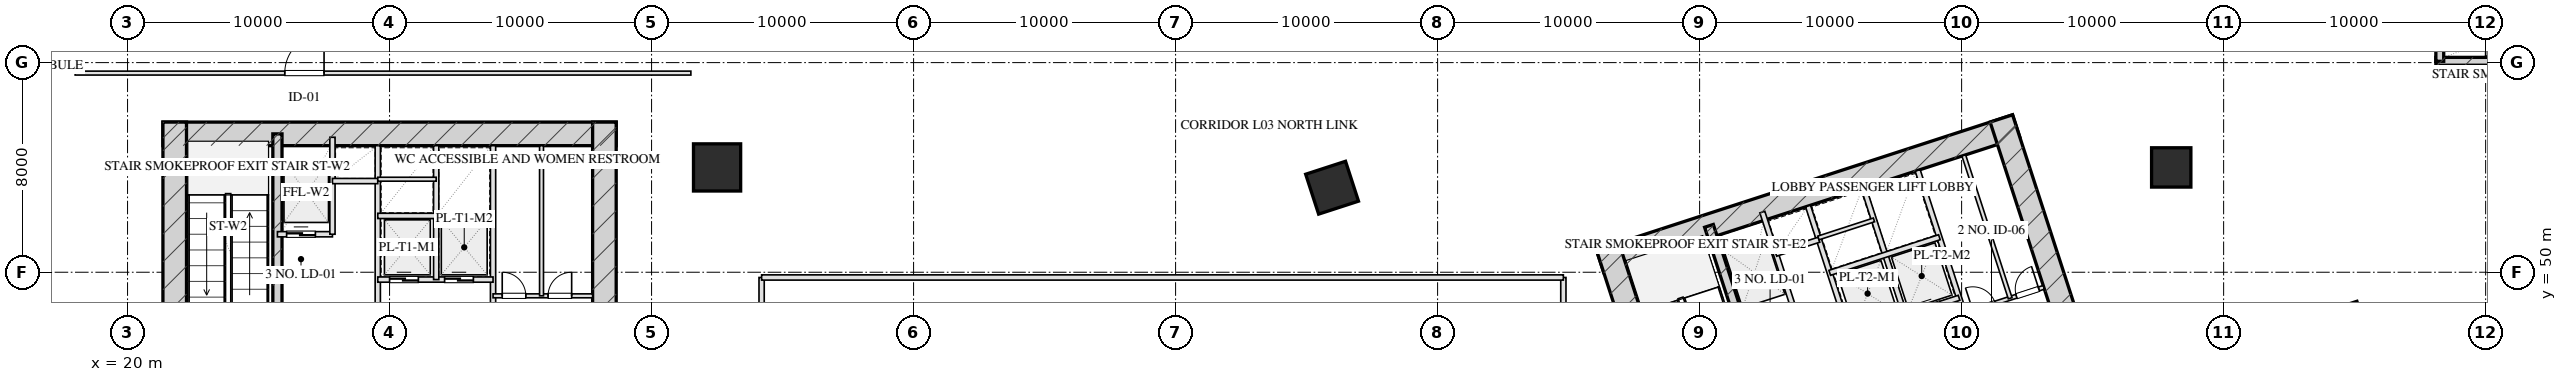
"""IFC4 building model, lengths in metres.
Left out: names, types, materials, properties, quantities, classifications, styles, units other than length and angle.
Written with IfcOpenShell. Run it as: python <this file> out.ifc"""

import sys

from ifc_helpers import new_model, si_unit, direction, frame, frame_2d, origin, origin_2d, place, context, subcontext, project, spatial, rectangle, hollow_rectangle, extrude, element, fill, save


model = new_model("IFC4")
c1 = context("Model", 3, precision=1e-05, world=origin(), true_north=direction((0.0, 1.0)))
c2 = subcontext(c1, "Body", "Model", "MODEL_VIEW")
j1 = project(units=[si_unit("LENGTHUNIT", "METRE"), si_unit("PLANEANGLEUNIT", "RADIAN")], contexts=[c1])
p1 = place(None, origin())
s1 = spatial("IfcSite", under=j1, at=p1, CompositionType="ELEMENT")
p2 = place(p1, origin())
s2 = spatial("IfcBuilding", under=s1, at=p2, CompositionType="ELEMENT")
p3 = place(p2, frame((0.0, 0.0, 16.5)))
s3 = spatial("IfcBuildingStorey", under=s2, at=p3, CompositionType="ELEMENT", Elevation=16.5)
p4 = place(p3, frame((21.35, 55.28, 0.0), z_axis=(0.0, 0.0, 1.0), x_axis=(1.0, 0.0, 0.0)))
e1 = element("IfcWall", 1, at=p4, inside=s3, PredefinedType="SHEAR", context=c2, shape_type="SweptSolid", body=[
    extrude(rectangle(XDim=17.3, YDim=0.9, at=frame_2d((8.65, 0.0))), origin(), (0.0, 0.0, 1.0), 5.5),
])
for number, where, z_axis, x_axis in (
    (2, (21.8, 45.95, 0.0), (0.0, 0.0, 1.0), (0.0, 1.0, 0.0)),
    (3, (38.2, 45.95, 0.0), (0.0, 0.0, 1.0), (0.0, 1.0, 0.0)),
):
    element("IfcWall", number, at=place(p3, frame(where, z_axis=z_axis, x_axis=x_axis)), inside=s3, PredefinedType="SHEAR", context=c2, shape_type="SweptSolid", body=[
        extrude(rectangle(XDim=9.78, YDim=0.9, at=frame_2d((4.89, 0.0))), origin(), (0.0, 0.0, 1.0), 5.5),
    ])
p5 = place(p3, frame((25.72, 48.3, 0.0), z_axis=(0.0, 0.0, 1.0), x_axis=(0.0, 1.0, 0.0)))
e4 = element("IfcWall", 4, at=p5, inside=s3, PredefinedType="SHEAR", context=c2, shape_type="SweptSolid", body=[
    extrude(rectangle(XDim=6.98, YDim=0.35, at=frame_2d((3.49, 0.0))), origin(), (0.0, 0.0, 1.0), 5.5),
])
p6 = place(p3, frame((76.201, 50.419, 0.0), z_axis=(0.0, 0.0, 1.0), x_axis=(0.951056412142, 0.309017314926, 0.0)))
e5 = element("IfcWall", 5, at=p6, inside=s3, PredefinedType="SHEAR", context=c2, shape_type="SweptSolid", body=[
    extrude(rectangle(XDim=16.7, YDim=0.9, at=frame_2d((8.35, 0.0))), origin(), (0.0, 0.0, 1.0), 5.5),
])
for number, where, z_axis, x_axis in (
    (6, (79.512, 41.685, 0.0), (0.0, 0.0, 1.0), (-0.309, 0.951, 0.0)),
    (7, (94.539, 46.568, 0.0), (0.0, 0.0, 1.0), (-0.309, 0.951, 0.0)),
):
    element("IfcWall", number, at=place(p3, frame(where, z_axis=z_axis, x_axis=x_axis)), inside=s3, PredefinedType="SHEAR", context=c2, shape_type="SweptSolid", body=[
        extrude(rectangle(XDim=9.78, YDim=0.9, at=frame_2d((4.89, 0.0))), origin(), (0.0, 0.0, 1.0), 5.5),
    ])
p7 = place(p3, frame((82.514, 45.131, 0.0), z_axis=(0.0, 0.0, 1.0), x_axis=(-0.308988790936, 0.951065679686, 0.0)))
e8 = element("IfcWall", 8, at=p7, inside=s3, PredefinedType="SHEAR", context=c2, shape_type="SweptSolid", body=[
    extrude(rectangle(XDim=6.98, YDim=0.35, at=frame_2d((3.49, 0.0))), origin(), (0.0, 0.0, 1.0), 5.5),
])
p8 = place(p3, frame((108.1, 58.05, 0.0), z_axis=(0.0, 0.0, 1.0), x_axis=(1.0, 0.0, 0.0)))
e9 = element("IfcWall", 9, at=p8, inside=s3, PredefinedType="SHEAR", context=c2, shape_type="SweptSolid", body=[
    extrude(rectangle(XDim=8.9, YDim=0.3, at=frame_2d((4.45, 0.0))), origin(), (0.0, 0.0, 1.0), 5.5),
])
p9 = place(p3, frame((108.25, 58.05, 0.0), z_axis=(0.0, 0.0, 1.0), x_axis=(0.0, 1.0, 0.0)))
e10 = element("IfcWall", 10, at=p9, inside=s3, PredefinedType="SHEAR", context=c2, shape_type="SweptSolid", body=[
    extrude(rectangle(XDim=3.4, YDim=0.3, at=frame_2d((1.7, 0.0))), origin(), (0.0, 0.0, 1.0), 5.5),
])
p10 = place(p9, frame((0.65, 0.0, 0.0)))
e11 = element("IfcOpeningElement", 11, at=p10, cuts=e10, PredefinedType="OPENING", context=c2, shape_type="SweptSolid", body=[
    extrude(rectangle(XDim=1.2, YDim=2.05, at=frame_2d((0.6, 1.025))), frame((0.0, 0.16, 0.0), z_axis=(0.0, -1.0, 0.0), x_axis=(1.0, 0.0, 0.0)), (0.0, 0.0, 1.0), 0.32),
])
p11 = place(p3, frame((42.5, 54.0, 0.0), z_axis=(0.0, 0.0, 1.0), x_axis=(1.0, 0.0, 0.0)))
e12 = element("IfcColumn", 12, at=p11, inside=s3, PredefinedType="COLUMN", context=c2, shape_type="SweptSolid", body=[
    extrude(hollow_rectangle(XDim=1.8, YDim=1.8, WallThickness=0.06, at=origin_2d()), origin(), (0.0, 0.0, 1.0), 5.501),
])
p12 = place(p3, frame((98.0, 54.0, 0.0), z_axis=(0.0, 0.0, 1.0), x_axis=(1.0, 0.0, 0.0)))
e13 = element("IfcColumn", 13, at=p12, inside=s3, PredefinedType="COLUMN", context=c2, shape_type="SweptSolid", body=[
    extrude(rectangle(XDim=1.5, YDim=1.5, at=origin_2d()), origin(), (0.0, 0.0, 1.0), 5.501),
])
p13 = place(p3, frame((65.973, 53.226, 0.0), z_axis=(0.0, 0.0, 1.0), x_axis=(0.951056516295, 0.309016994375, 0.0)))
e14 = element("IfcColumn", 14, at=p13, inside=s3, PredefinedType="COLUMN", context=c2, shape_type="SweptSolid", body=[
    extrude(hollow_rectangle(XDim=1.6, YDim=1.6, WallThickness=0.055, at=origin_2d()), origin(), (0.0, 0.0, 1.0), 5.501),
])
p14 = place(p3, frame((104.766, 48.261, 0.0), z_axis=(0.0, 0.0, 1.0), x_axis=(0.951056516295, 0.309016994375, 0.0)))
e15 = element("IfcColumn", 15, at=p14, inside=s3, PredefinedType="COLUMN", context=c2, shape_type="SweptSolid", body=[
    extrude(hollow_rectangle(XDim=1.0, YDim=1.0, WallThickness=0.036, at=origin_2d()), origin(), (0.0, 0.0, 1.0), 5.501),
])
p15 = place(p3, frame((29.55, 46.4, 0.0), z_axis=(0.0, 0.0, 1.0), x_axis=(0.0, 1.0, 0.0)))
e16 = element("IfcWall", 16, at=p15, inside=s3, PredefinedType="PARTITIONING", context=c2, shape_type="SweptSolid", body=[
    extrude(rectangle(XDim=8.43, YDim=0.2, at=frame_2d((4.215, 0.0))), origin(), (0.0, 0.0, 1.0), 5.185),
])
p16 = place(p3, frame((25.72, 51.45, 0.0), z_axis=(0.0, 0.0, 1.0), x_axis=(1.0, 0.0, 0.0)))
e17 = element("IfcWall", 17, at=p16, inside=s3, PredefinedType="PARTITIONING", context=c2, shape_type="SweptSolid", body=[
    extrude(rectangle(XDim=2.1, YDim=0.2, at=frame_2d((1.05, 0.0))), origin(), (0.0, 0.0, 1.0), 5.185),
])
p17 = place(p16, frame((0.35, 0.0, 0.0)))
e18 = element("IfcOpeningElement", 18, at=p17, cuts=e17, PredefinedType="OPENING", context=c2, shape_type="SweptSolid", body=[
    extrude(rectangle(XDim=1.1, YDim=2.05, at=frame_2d((0.55, 1.025))), frame((0.0, 0.11, 0.0), z_axis=(0.0, -1.0, 0.0), x_axis=(1.0, 0.0, 0.0)), (0.0, 0.0, 1.0), 0.22),
])
p18 = place(p3, frame((27.82, 51.45, 0.0), z_axis=(0.0, 0.0, 1.0), x_axis=(0.0, 1.0, 0.0)))
e19 = element("IfcWall", 19, at=p18, inside=s3, PredefinedType="PARTITIONING", context=c2, shape_type="SweptSolid", body=[
    extrude(rectangle(XDim=3.7, YDim=0.2, at=frame_2d((1.85, 0.0))), origin(), (0.0, 0.0, 1.0), 5.185),
])
p19 = place(p3, frame((27.82, 53.48, 0.0), z_axis=(0.0, 0.0, 1.0), x_axis=(1.0, 0.0, 0.0)))
e20 = element("IfcWall", 20, at=p19, inside=s3, PredefinedType="PARTITIONING", context=c2, shape_type="SweptSolid", body=[
    extrude(rectangle(XDim=1.73, YDim=0.2, at=frame_2d((0.865, 0.0))), origin(), (0.0, 0.0, 1.0), 5.185),
])
p20 = place(p3, frame((33.95, 46.4, 0.0), z_axis=(0.0, 0.0, 1.0), x_axis=(0.0, 1.0, 0.0)))
e21 = element("IfcWall", 21, at=p20, inside=s3, PredefinedType="PARTITIONING", context=c2, shape_type="SweptSolid", body=[
    extrude(rectangle(XDim=8.43, YDim=0.2, at=frame_2d((4.215, 0.0))), origin(), (0.0, 0.0, 1.0), 5.185),
])
p21 = place(p3, frame((29.55, 49.72, 0.0), z_axis=(0.0, 0.0, 1.0), x_axis=(1.0, 0.0, 0.0)))
e22 = element("IfcWall", 22, at=p21, inside=s3, PredefinedType="PARTITIONING", context=c2, shape_type="SweptSolid", body=[
    extrude(rectangle(XDim=4.4, YDim=0.2, at=frame_2d((2.2, 0.0))), origin(), (0.0, 0.0, 1.0), 5.185),
])
p22 = place(p21, frame((0.45, 0.0, 0.0)))
e23 = element("IfcOpeningElement", 23, at=p22, cuts=e22, PredefinedType="OPENING", context=c2, shape_type="SweptSolid", body=[
    extrude(rectangle(XDim=1.1, YDim=2.05, at=frame_2d((0.55, 1.025))), frame((0.0, 0.11, 0.0), z_axis=(0.0, -1.0, 0.0), x_axis=(1.0, 0.0, 0.0)), (0.0, 0.0, 1.0), 0.22),
])
p23 = place(p21, frame((2.55, 0.0, 0.0)))
e24 = element("IfcOpeningElement", 24, at=p23, cuts=e22, PredefinedType="OPENING", context=c2, shape_type="SweptSolid", body=[
    extrude(rectangle(XDim=1.1, YDim=2.05, at=frame_2d((0.55, 1.025))), frame((0.0, 0.11, 0.0), z_axis=(0.0, -1.0, 0.0), x_axis=(1.0, 0.0, 0.0)), (0.0, 0.0, 1.0), 0.22),
])
p24 = place(p3, frame((31.78, 49.72, 0.0), z_axis=(0.0, 0.0, 1.0), x_axis=(0.0, 1.0, 0.0)))
e25 = element("IfcWall", 25, at=p24, inside=s3, PredefinedType="PARTITIONING", context=c2, shape_type="SweptSolid", body=[
    extrude(rectangle(XDim=5.11, YDim=0.2, at=frame_2d((2.555, 0.0))), origin(), (0.0, 0.0, 1.0), 5.185),
])
p25 = place(p3, frame((29.55, 52.15, 0.0), z_axis=(0.0, 0.0, 1.0), x_axis=(1.0, 0.0, 0.0)))
e26 = element("IfcWall", 26, at=p25, inside=s3, PredefinedType="PARTITIONING", context=c2, shape_type="SweptSolid", body=[
    extrude(rectangle(XDim=4.4, YDim=0.2, at=frame_2d((2.2, 0.0))), origin(), (0.0, 0.0, 1.0), 5.185),
])
p26 = place(p3, frame((29.55, 53.55, 0.0), z_axis=(0.0, 0.0, 1.0), x_axis=(1.0, 0.0, 0.0)))
e27 = element("IfcWall", 27, at=p26, inside=s3, PredefinedType="PARTITIONING", context=c2, shape_type="SweptSolid", body=[
    extrude(rectangle(XDim=2.23, YDim=0.15, at=frame_2d((1.115, 0.0))), origin(), (0.0, 0.0, 1.0), 5.185),
])
p27 = place(p3, frame((33.95, 49.1, 0.0), z_axis=(0.0, 0.0, 1.0), x_axis=(1.0, 0.0, 0.0)))
e28 = element("IfcWall", 28, at=p27, inside=s3, PredefinedType="PARTITIONING", context=c2, shape_type="SweptSolid", body=[
    extrude(rectangle(XDim=3.8, YDim=0.15, at=frame_2d((1.9, 0.0))), origin(), (0.0, 0.0, 1.0), 5.185),
])
p28 = place(p27, frame((0.35, 0.0, 0.0)))
e29 = element("IfcOpeningElement", 29, at=p28, cuts=e28, PredefinedType="OPENING", context=c2, shape_type="SweptSolid", body=[
    extrude(rectangle(XDim=0.9, YDim=2.05, at=frame_2d((0.45, 1.025))), frame((0.0, 0.085, 0.0), z_axis=(0.0, -1.0, 0.0), x_axis=(1.0, 0.0, 0.0)), (0.0, 0.0, 1.0), 0.17),
])
p29 = place(p27, frame((2.1, 0.0, 0.0)))
e30 = element("IfcOpeningElement", 30, at=p29, cuts=e28, PredefinedType="OPENING", context=c2, shape_type="SweptSolid", body=[
    extrude(rectangle(XDim=0.9, YDim=2.05, at=frame_2d((0.45, 1.025))), frame((0.0, 0.085, 0.0), z_axis=(0.0, -1.0, 0.0), x_axis=(1.0, 0.0, 0.0)), (0.0, 0.0, 1.0), 0.17),
])
p30 = place(p3, frame((35.8, 49.1, 0.0), z_axis=(0.0, 0.0, 1.0), x_axis=(0.0, 1.0, 0.0)))
e31 = element("IfcWall", 31, at=p30, inside=s3, PredefinedType="PARTITIONING", context=c2, shape_type="SweptSolid", body=[
    extrude(rectangle(XDim=5.73, YDim=0.15, at=frame_2d((2.865, 0.0))), origin(), (0.0, 0.0, 1.0), 5.185),
])
p31 = place(p3, frame((86.743, 44.508, 0.0), z_axis=(0.0, 0.0, 1.0), x_axis=(-0.309016001439, 0.951056838919, 0.0)))
e32 = element("IfcWall", 32, at=p31, inside=s3, PredefinedType="PARTITIONING", context=c2, shape_type="SweptSolid", body=[
    extrude(rectangle(XDim=8.43, YDim=0.2, at=frame_2d((4.215, 0.0))), origin(), (0.0, 0.0, 1.0), 5.185),
])
p32 = place(p3, frame((81.54, 48.127, 0.0), z_axis=(0.0, 0.0, 1.0), x_axis=(0.951062257173, 0.308999325213, 0.0)))
e33 = element("IfcWall", 33, at=p32, inside=s3, PredefinedType="PARTITIONING", context=c2, shape_type="SweptSolid", body=[
    extrude(rectangle(XDim=2.1, YDim=0.2, at=frame_2d((1.05, 0.0))), origin(), (0.0, 0.0, 1.0), 5.185),
])
p33 = place(p32, frame((0.35, 0.0, 0.0)))
e34 = element("IfcOpeningElement", 34, at=p33, cuts=e33, PredefinedType="OPENING", context=c2, shape_type="SweptSolid", body=[
    extrude(rectangle(XDim=1.1, YDim=2.05, at=frame_2d((0.55, 1.025))), frame((0.0, 0.11, 0.0), z_axis=(0.0, -1.0, 0.0), x_axis=(1.0, 0.0, 0.0)), (0.0, 0.0, 1.0), 0.22),
])
p34 = place(p3, frame((83.538, 48.776, 0.0), z_axis=(0.0, 0.0, 1.0), x_axis=(-0.3089935693, 0.951064127245, 0.0)))
e35 = element("IfcWall", 35, at=p34, inside=s3, PredefinedType="PARTITIONING", context=c2, shape_type="SweptSolid", body=[
    extrude(rectangle(XDim=3.7, YDim=0.2, at=frame_2d((1.85, 0.0))), origin(), (0.0, 0.0, 1.0), 5.185),
])
p35 = place(p3, frame((82.91, 50.707, 0.0), z_axis=(0.0, 0.0, 1.0), x_axis=(0.951041328149, 0.309063734775, 0.0)))
e36 = element("IfcWall", 36, at=p35, inside=s3, PredefinedType="PARTITIONING", context=c2, shape_type="SweptSolid", body=[
    extrude(rectangle(XDim=1.73, YDim=0.2, at=frame_2d((0.865, 0.0))), origin(), (0.0, 0.0, 1.0), 5.185),
])
p36 = place(p3, frame((90.928, 45.868, 0.0), z_axis=(0.0, 0.0, 1.0), x_axis=(-0.309042196757, 0.951048327176, 0.0)))
e37 = element("IfcWall", 37, at=p36, inside=s3, PredefinedType="PARTITIONING", context=c2, shape_type="SweptSolid", body=[
    extrude(rectangle(XDim=8.43, YDim=0.2, at=frame_2d((4.215, 0.0))), origin(), (0.0, 0.0, 1.0), 5.185),
])
p37 = place(p3, frame((85.718, 47.666, 0.0), z_axis=(0.0, 0.0, 1.0), x_axis=(0.951058531764, 0.30901079133, 0.0)))
e38 = element("IfcWall", 38, at=p37, inside=s3, PredefinedType="PARTITIONING", context=c2, shape_type="SweptSolid", body=[
    extrude(rectangle(XDim=4.4, YDim=0.2, at=frame_2d((2.2, 0.0))), origin(), (0.0, 0.0, 1.0), 5.185),
])
p38 = place(p37, frame((0.45, 0.0, 0.0)))
e39 = element("IfcOpeningElement", 39, at=p38, cuts=e38, PredefinedType="OPENING", context=c2, shape_type="SweptSolid", body=[
    extrude(rectangle(XDim=1.1, YDim=2.05, at=frame_2d((0.55, 1.025))), frame((0.0, 0.11, 0.0), z_axis=(0.0, -1.0, 0.0), x_axis=(1.0, 0.0, 0.0)), (0.0, 0.0, 1.0), 0.22),
])
p39 = place(p37, frame((2.55, 0.0, 0.0)))
e40 = element("IfcOpeningElement", 40, at=p39, cuts=e38, PredefinedType="OPENING", context=c2, shape_type="SweptSolid", body=[
    extrude(rectangle(XDim=1.1, YDim=2.05, at=frame_2d((0.55, 1.025))), frame((0.0, 0.11, 0.0), z_axis=(0.0, -1.0, 0.0), x_axis=(1.0, 0.0, 0.0)), (0.0, 0.0, 1.0), 0.22),
])
p40 = place(p3, frame((87.838, 48.354, 0.0), z_axis=(0.0, 0.0, 1.0), x_axis=(-0.3090093719, 0.951058992953, 0.0)))
e41 = element("IfcWall", 41, at=p40, inside=s3, PredefinedType="PARTITIONING", context=c2, shape_type="SweptSolid", body=[
    extrude(rectangle(XDim=5.11, YDim=0.2, at=frame_2d((2.555, 0.0))), origin(), (0.0, 0.0, 1.0), 5.185),
])
p41 = place(p3, frame((84.967, 49.977, 0.0), z_axis=(0.0, 0.0, 1.0), x_axis=(0.951063829732, 0.308994485023, 0.0)))
e42 = element("IfcWall", 42, at=p41, inside=s3, PredefinedType="PARTITIONING", context=c2, shape_type="SweptSolid", body=[
    extrude(rectangle(XDim=4.4, YDim=0.2, at=frame_2d((2.2, 0.0))), origin(), (0.0, 0.0, 1.0), 5.185),
])
p42 = place(p3, frame((84.534, 51.308, 0.0), z_axis=(0.0, 0.0, 1.0), x_axis=(0.951075093106, 0.308959814982, 0.0)))
e43 = element("IfcWall", 43, at=p42, inside=s3, PredefinedType="PARTITIONING", context=c2, shape_type="SweptSolid", body=[
    extrude(rectangle(XDim=2.23, YDim=0.15, at=frame_2d((1.115, 0.0))), origin(), (0.0, 0.0, 1.0), 5.185),
])
p43 = place(p3, frame((90.094, 48.436, 0.0), z_axis=(0.0, 0.0, 1.0), x_axis=(0.951066581729, 0.308986014439, 0.0)))
e44 = element("IfcWall", 44, at=p43, inside=s3, PredefinedType="PARTITIONING", context=c2, shape_type="SweptSolid", body=[
    extrude(rectangle(XDim=3.2, YDim=0.15, at=frame_2d((1.6, 0.0))), origin(), (0.0, 0.0, 1.0), 5.185),
])
p44 = place(p43, frame((0.35, 0.0, 0.0)))
e45 = element("IfcOpeningElement", 45, at=p44, cuts=e44, PredefinedType="OPENING", context=c2, shape_type="SweptSolid", body=[
    extrude(rectangle(XDim=0.9, YDim=2.05, at=frame_2d((0.45, 1.025))), frame((0.0, 0.085, 0.0), z_axis=(0.0, -1.0, 0.0), x_axis=(1.0, 0.0, 0.0)), (0.0, 0.0, 1.0), 0.17),
])
p45 = place(p43, frame((2.1, 0.0, 0.0)))
e46 = element("IfcOpeningElement", 46, at=p45, cuts=e44, PredefinedType="OPENING", context=c2, shape_type="SweptSolid", body=[
    extrude(rectangle(XDim=0.9, YDim=2.05, at=frame_2d((0.45, 1.025))), frame((0.0, 0.085, 0.0), z_axis=(0.0, -1.0, 0.0), x_axis=(1.0, 0.0, 0.0)), (0.0, 0.0, 1.0), 0.17),
])
p46 = place(p3, frame((91.853, 49.007, 0.0), z_axis=(0.0, 0.0, 1.0), x_axis=(-0.309022487551, 0.951054731437, 0.0)))
e47 = element("IfcWall", 47, at=p46, inside=s3, PredefinedType="PARTITIONING", context=c2, shape_type="SweptSolid", body=[
    extrude(rectangle(XDim=5.73, YDim=0.15, at=frame_2d((2.865, 0.0))), origin(), (0.0, 0.0, 1.0), 5.185),
])
p47 = place(p3, frame((44.2, 18.2, 0.0), z_axis=(0.0, 0.0, 1.0), x_axis=(0.0, 1.0, 0.0)))
e48 = element("IfcWall", 48, at=p47, inside=s3, PredefinedType="PARTITIONING", context=c2, shape_type="SweptSolid", body=[
    extrude(rectangle(XDim=31.6, YDim=0.2, at=frame_2d((15.8, 0.0))), origin(), (0.0, 0.0, 1.0), 5.185),
])
p48 = place(p47, frame((5.1, 0.0, 0.0)))
e49 = element("IfcOpeningElement", 49, at=p48, cuts=e48, PredefinedType="OPENING", context=c2, shape_type="SweptSolid", body=[
    extrude(rectangle(XDim=1.2, YDim=2.05, at=frame_2d((0.6, 1.025))), frame((0.0, 0.11, 0.0), z_axis=(0.0, -1.0, 0.0), x_axis=(1.0, 0.0, 0.0)), (0.0, 0.0, 1.0), 0.22),
])
p49 = place(p47, frame((20.0, 0.0, 0.0)))
e50 = element("IfcOpeningElement", 50, at=p49, cuts=e48, PredefinedType="OPENING", context=c2, shape_type="SweptSolid", body=[
    extrude(rectangle(XDim=1.2, YDim=2.05, at=frame_2d((0.6, 1.025))), frame((0.0, 0.11, 0.0), z_axis=(0.0, -1.0, 0.0), x_axis=(1.0, 0.0, 0.0)), (0.0, 0.0, 1.0), 0.22),
])
p50 = place(p3, frame((74.8, 18.2, 0.0), z_axis=(0.0, 0.0, 1.0), x_axis=(0.0, 1.0, 0.0)))
e51 = element("IfcWall", 51, at=p50, inside=s3, PredefinedType="PARTITIONING", context=c2, shape_type="SweptSolid", body=[
    extrude(rectangle(XDim=31.6, YDim=0.2, at=frame_2d((15.8, 0.0))), origin(), (0.0, 0.0, 1.0), 5.185),
])
p51 = place(p50, frame((23.0, 0.0, 0.0)))
e52 = element("IfcOpeningElement", 52, at=p51, cuts=e51, PredefinedType="OPENING", context=c2, shape_type="SweptSolid", body=[
    extrude(rectangle(XDim=1.2, YDim=2.05, at=frame_2d((0.6, 1.025))), frame((0.0, 0.11, 0.0), z_axis=(0.0, -1.0, 0.0), x_axis=(1.0, 0.0, 0.0)), (0.0, 0.0, 1.0), 0.22),
])
p52 = place(p3, frame((44.2, 49.8, 0.0), z_axis=(0.0, 0.0, 1.0), x_axis=(1.0, 0.0, 0.0)))
e53 = element("IfcWall", 53, at=p52, inside=s3, PredefinedType="PARTITIONING", context=c2, shape_type="SweptSolid", body=[
    extrude(rectangle(XDim=30.6, YDim=0.2, at=frame_2d((15.3, 0.0))), origin(), (0.0, 0.0, 1.0), 5.185),
])
p53 = place(p3, frame((18.0, 57.6, 0.0), z_axis=(0.0, 0.0, 1.0), x_axis=(1.0, 0.0, 0.0)))
e54 = element("IfcWall", 54, at=p53, inside=s3, PredefinedType="PARTITIONING", context=c2, shape_type="SweptSolid", body=[
    extrude(rectangle(XDim=23.5, YDim=0.15, at=frame_2d((11.75, 0.0))), origin(), (0.0, 0.0, 1.0), 5.185),
])
p54 = place(p53, frame((8.0, 0.0, 0.0)))
e55 = element("IfcOpeningElement", 55, at=p54, cuts=e54, PredefinedType="OPENING", context=c2, shape_type="SweptSolid", body=[
    extrude(rectangle(XDim=1.5, YDim=2.05, at=frame_2d((0.75, 1.025))), frame((0.0, 0.085, 0.0), z_axis=(0.0, -1.0, 0.0), x_axis=(1.0, 0.0, 0.0)), (0.0, 0.0, 1.0), 0.17),
])
p55 = place(p17, origin())
e56 = element("IfcDoor", 56, at=p55, inside=s3, OperationType="DOUBLE_DOOR_SLIDING", PredefinedType="DOOR", context=c2, shape_type="SweptSolid", body=[
    extrude(rectangle(XDim=1.1, YDim=2.05, at=frame_2d((0.55, 1.025))), frame((0.0, 0.025, 0.0), z_axis=(0.0, -1.0, 0.0), x_axis=(1.0, 0.0, 0.0)), (0.0, 0.0, 1.0), 0.05),
])
fill(e18, e56)
p56 = place(p22, origin())
e57 = element("IfcDoor", 57, at=p56, inside=s3, OperationType="DOUBLE_DOOR_SLIDING", PredefinedType="DOOR", context=c2, shape_type="SweptSolid", body=[
    extrude(rectangle(XDim=1.1, YDim=2.05, at=frame_2d((0.55, 1.025))), frame((0.0, 0.025, 0.0), z_axis=(0.0, -1.0, 0.0), x_axis=(1.0, 0.0, 0.0)), (0.0, 0.0, 1.0), 0.05),
])
fill(e23, e57)
p57 = place(p23, origin())
e58 = element("IfcDoor", 58, at=p57, inside=s3, OperationType="DOUBLE_DOOR_SLIDING", PredefinedType="DOOR", context=c2, shape_type="SweptSolid", body=[
    extrude(rectangle(XDim=1.1, YDim=2.05, at=frame_2d((0.55, 1.025))), frame((0.0, 0.025, 0.0), z_axis=(0.0, -1.0, 0.0), x_axis=(1.0, 0.0, 0.0)), (0.0, 0.0, 1.0), 0.05),
])
fill(e24, e58)
p58 = place(p28, origin())
e59 = element("IfcDoor", 59, at=p58, inside=s3, OperationType="SINGLE_SWING_LEFT", PredefinedType="DOOR", context=c2, shape_type="SweptSolid", body=[
    extrude(rectangle(XDim=0.9, YDim=2.05, at=frame_2d((0.45, 1.025))), frame((0.0, 0.025, 0.0), z_axis=(0.0, -1.0, 0.0), x_axis=(1.0, 0.0, 0.0)), (0.0, 0.0, 1.0), 0.05),
])
fill(e29, e59)
p59 = place(p29, origin())
e60 = element("IfcDoor", 60, at=p59, inside=s3, OperationType="SINGLE_SWING_RIGHT", PredefinedType="DOOR", context=c2, shape_type="SweptSolid", body=[
    extrude(rectangle(XDim=0.9, YDim=2.05, at=frame_2d((0.45, 1.025))), frame((0.0, 0.025, 0.0), z_axis=(0.0, -1.0, 0.0), x_axis=(1.0, 0.0, 0.0)), (0.0, 0.0, 1.0), 0.05),
])
fill(e30, e60)
p60 = place(p44, origin())
e61 = element("IfcDoor", 61, at=p60, inside=s3, OperationType="SINGLE_SWING_LEFT", PredefinedType="DOOR", context=c2, shape_type="SweptSolid", body=[
    extrude(rectangle(XDim=0.9, YDim=2.05, at=frame_2d((0.45, 1.025))), frame((0.0, 0.025, 0.0), z_axis=(0.0, -1.0, 0.0), x_axis=(1.0, 0.0, 0.0)), (0.0, 0.0, 1.0), 0.05),
])
fill(e45, e61)
p61 = place(p45, origin())
e62 = element("IfcDoor", 62, at=p61, inside=s3, OperationType="SINGLE_SWING_RIGHT", PredefinedType="DOOR", context=c2, shape_type="SweptSolid", body=[
    extrude(rectangle(XDim=0.9, YDim=2.05, at=frame_2d((0.45, 1.025))), frame((0.0, 0.025, 0.0), z_axis=(0.0, -1.0, 0.0), x_axis=(1.0, 0.0, 0.0)), (0.0, 0.0, 1.0), 0.05),
])
fill(e46, e62)
p62 = place(p54, origin())
e63 = element("IfcDoor", 63, at=p62, inside=s3, OperationType="SINGLE_SWING_RIGHT", PredefinedType="DOOR", context=c2, shape_type="SweptSolid", body=[
    extrude(rectangle(XDim=1.5, YDim=2.05, at=frame_2d((0.75, 1.025))), frame((0.0, 0.025, 0.0), z_axis=(0.0, -1.0, 0.0), x_axis=(1.0, 0.0, 0.0)), (0.0, 0.0, 1.0), 0.05),
])
fill(e55, e63)
save(model, sys.argv[1])
